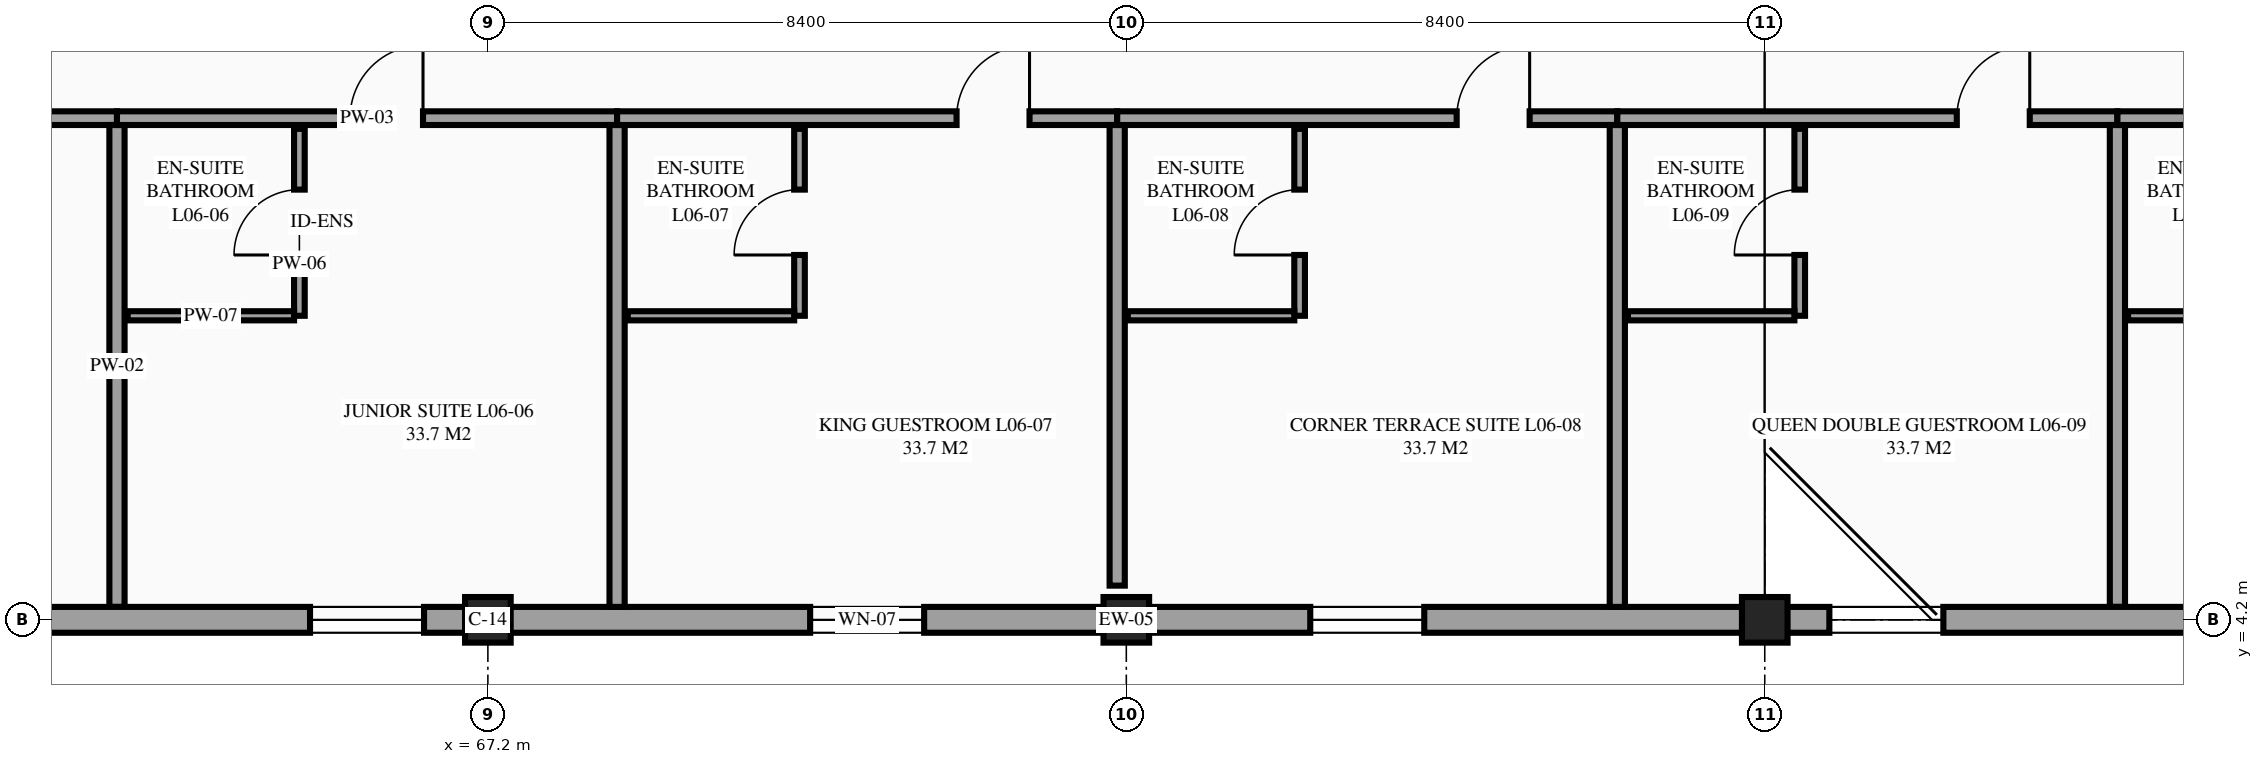
"""IFC4 building model, lengths in metres.
Left out: names, types, materials, properties, quantities, classifications, styles, units other than length and angle.
Written with IfcOpenShell. Run it as: python <this file> out.ifc"""

import sys

from ifc_helpers import new_model, si_unit, direction, frame, frame_2d, origin, origin_2d, place, context, subcontext, project, spatial, rectangle, extrude, element, fill, save


model = new_model("IFC4")
c1 = context("Model", 3, precision=1e-05, world=origin(), true_north=direction((0.0, 1.0)))
c2 = subcontext(c1, "Body", "Model", "MODEL_VIEW")
j1 = project(units=[si_unit("LENGTHUNIT", "METRE"), si_unit("PLANEANGLEUNIT", "RADIAN")], contexts=[c1])
p1 = place(None, origin())
s1 = spatial("IfcSite", under=j1, at=p1, CompositionType="ELEMENT")
p2 = place(p1, origin())
s2 = spatial("IfcBuilding", under=s1, at=p2, CompositionType="ELEMENT")
p3 = place(p2, frame((0.0, 0.0, 25.5)))
s3 = spatial("IfcBuildingStorey", under=s2, at=p3, CompositionType="ELEMENT", Elevation=25.5)
for number, where, z_axis, x_axis in (
    (1, (67.2, 4.2, 0.0), (0.0, 0.0, 1.0), (1.0, 0.0, 0.0)),
    (2, (75.6, 4.2, 0.0), (0.0, 0.0, 1.0), (1.0, 0.0, 0.0)),
    (3, (84.0, 4.2, 0.0), (0.0, 0.0, 1.0), (1.0, 0.0, 0.0)),
):
    element("IfcColumn", number, at=place(p3, frame(where, z_axis=z_axis, x_axis=x_axis)), inside=s3, PredefinedType="COLUMN", context=c2, shape_type="SweptSolid", body=[
        extrude(rectangle(XDim=0.6, YDim=0.6, at=origin_2d()), origin(), (0.0, 0.0, 1.0), 3.6),
    ])
p4 = place(p3, frame((67.2, 4.2, 0.0), z_axis=(0.0, 0.0, 1.0), x_axis=(1.0, 0.0, 0.0)))
e4 = element("IfcWall", 4, at=p4, inside=s3, PredefinedType="STANDARD", context=c2, shape_type="SweptSolid", body=[
    extrude(rectangle(XDim=16.8, YDim=0.34, at=frame_2d((8.4, 0.0))), origin(), (0.0, 0.0, 1.0), 2.43),
])
p5 = place(p4, frame((4.24, 0.0, 0.85)))
e5 = element("IfcOpeningElement", 5, at=p5, cuts=e4, PredefinedType="OPENING", context=c2, shape_type="SweptSolid", body=[
    extrude(rectangle(XDim=1.5, YDim=1.5, at=frame_2d((0.75, 0.75))), frame((0.0, 0.18, 0.0), z_axis=(0.0, -1.0, 0.0), x_axis=(1.0, 0.0, 0.0)), (0.0, 0.0, 1.0), 0.36),
])
p6 = place(p4, frame((10.82, 0.0, 0.85)))
e6 = element("IfcOpeningElement", 6, at=p6, cuts=e4, PredefinedType="OPENING", context=c2, shape_type="SweptSolid", body=[
    extrude(rectangle(XDim=1.5, YDim=1.5, at=frame_2d((0.75, 0.75))), frame((0.0, 0.18, 0.0), z_axis=(0.0, -1.0, 0.0), x_axis=(1.0, 0.0, 0.0)), (0.0, 0.0, 1.0), 0.36),
])
p7 = place(p3, frame((55.74, 10.8, 0.0), z_axis=(0.0, 0.0, 1.0), x_axis=(1.0, 0.0, 0.0)))
e7 = element("IfcWall", 7, at=p7, inside=s3, PredefinedType="PARTITIONING", context=c2, shape_type="SweptSolid", body=[
    extrude(rectangle(XDim=6.58, YDim=0.18, at=frame_2d((3.29, 0.0))), origin(), (0.0, 0.0, 1.0), 3.375),
])
p8 = place(p7, frame((4.467, 0.0, 0.0)))
e8 = element("IfcOpeningElement", 8, at=p8, cuts=e7, PredefinedType="OPENING", context=c2, shape_type="SweptSolid", body=[
    extrude(rectangle(XDim=0.96, YDim=2.15, at=frame_2d((0.48, 1.075))), frame((0.0, 0.1, 0.0), z_axis=(0.0, -1.0, 0.0), x_axis=(1.0, 0.0, 0.0)), (0.0, 0.0, 1.0), 0.2),
])
p9 = place(p3, frame((62.32, 4.37, 0.0), z_axis=(0.0, 0.0, 1.0), x_axis=(0.0, 1.0, 0.0)))
e9 = element("IfcWall", 9, at=p9, inside=s3, PredefinedType="PARTITIONING", context=c2, shape_type="SweptSolid", body=[
    extrude(rectangle(XDim=6.34, YDim=0.2, at=frame_2d((3.17, 0.0))), origin(), (0.0, 0.0, 1.0), 3.375),
])
p10 = place(p3, frame((62.32, 10.8, 0.0), z_axis=(0.0, 0.0, 1.0), x_axis=(1.0, 0.0, 0.0)))
e10 = element("IfcWall", 10, at=p10, inside=s3, PredefinedType="PARTITIONING", context=c2, shape_type="SweptSolid", body=[
    extrude(rectangle(XDim=6.58, YDim=0.18, at=frame_2d((3.29, 0.0))), origin(), (0.0, 0.0, 1.0), 3.375),
])
p11 = place(p10, frame((3.067, 0.0, 0.0)))
e11 = element("IfcOpeningElement", 11, at=p11, cuts=e10, PredefinedType="OPENING", context=c2, shape_type="SweptSolid", body=[
    extrude(rectangle(XDim=0.96, YDim=2.15, at=frame_2d((0.48, 1.075))), frame((0.0, 0.1, 0.0), z_axis=(0.0, -1.0, 0.0), x_axis=(1.0, 0.0, 0.0)), (0.0, 0.0, 1.0), 0.2),
])
p12 = place(p3, frame((68.9, 4.37, 0.0), z_axis=(0.0, 0.0, 1.0), x_axis=(0.0, 1.0, 0.0)))
e12 = element("IfcWall", 12, at=p12, inside=s3, PredefinedType="PARTITIONING", context=c2, shape_type="SweptSolid", body=[
    extrude(rectangle(XDim=6.34, YDim=0.2, at=frame_2d((3.17, 0.0))), origin(), (0.0, 0.0, 1.0), 3.375),
])
p13 = place(p3, frame((64.72, 8.2, 0.0), z_axis=(0.0, 0.0, 1.0), x_axis=(0.0, 1.0, 0.0)))
e13 = element("IfcWall", 13, at=p13, inside=s3, PredefinedType="PARTITIONING", context=c2, shape_type="SweptSolid", body=[
    extrude(rectangle(XDim=2.46, YDim=0.14, at=frame_2d((1.23, 0.0))), origin(), (0.0, 0.0, 1.0), 3.375),
])
p14 = place(p13, frame((0.8, 0.0, 0.0)))
e14 = element("IfcOpeningElement", 14, at=p14, cuts=e13, PredefinedType="OPENING", context=c2, shape_type="SweptSolid", body=[
    extrude(rectangle(XDim=0.86, YDim=2.1, at=frame_2d((0.43, 1.05))), frame((0.0, 0.08, 0.0), z_axis=(0.0, -1.0, 0.0), x_axis=(1.0, 0.0, 0.0)), (0.0, 0.0, 1.0), 0.16),
])
p15 = place(p3, frame((62.46, 8.2, 0.0), z_axis=(0.0, 0.0, 1.0), x_axis=(1.0, 0.0, 0.0)))
e15 = element("IfcWall", 15, at=p15, inside=s3, PredefinedType="PARTITIONING", context=c2, shape_type="SweptSolid", body=[
    extrude(rectangle(XDim=2.19, YDim=0.12, at=frame_2d((1.095, 0.0))), origin(), (0.0, 0.0, 1.0), 3.375),
])
p16 = place(p3, frame((68.9, 10.8, 0.0), z_axis=(0.0, 0.0, 1.0), x_axis=(1.0, 0.0, 0.0)))
e16 = element("IfcWall", 16, at=p16, inside=s3, PredefinedType="PARTITIONING", context=c2, shape_type="SweptSolid", body=[
    extrude(rectangle(XDim=6.58, YDim=0.18, at=frame_2d((3.29, 0.0))), origin(), (0.0, 0.0, 1.0), 3.375),
])
p17 = place(p16, frame((4.467, 0.0, 0.0)))
e17 = element("IfcOpeningElement", 17, at=p17, cuts=e16, PredefinedType="OPENING", context=c2, shape_type="SweptSolid", body=[
    extrude(rectangle(XDim=0.96, YDim=2.15, at=frame_2d((0.48, 1.075))), frame((0.0, 0.1, 0.0), z_axis=(0.0, -1.0, 0.0), x_axis=(1.0, 0.0, 0.0)), (0.0, 0.0, 1.0), 0.2),
])
p18 = place(p3, frame((75.48, 4.65, 0.0), z_axis=(0.0, 0.0, 1.0), x_axis=(0.0, 1.0, 0.0)))
e18 = element("IfcWall", 18, at=p18, inside=s3, PredefinedType="PARTITIONING", context=c2, shape_type="SweptSolid", body=[
    extrude(rectangle(XDim=6.06, YDim=0.2, at=frame_2d((3.03, 0.0))), origin(), (0.0, 0.0, 1.0), 2.53),
])
p19 = place(p3, frame((71.3, 8.2, 0.0), z_axis=(0.0, 0.0, 1.0), x_axis=(0.0, 1.0, 0.0)))
e19 = element("IfcWall", 19, at=p19, inside=s3, PredefinedType="PARTITIONING", context=c2, shape_type="SweptSolid", body=[
    extrude(rectangle(XDim=2.46, YDim=0.14, at=frame_2d((1.23, 0.0))), origin(), (0.0, 0.0, 1.0), 3.375),
])
p20 = place(p19, frame((0.8, 0.0, 0.0)))
e20 = element("IfcOpeningElement", 20, at=p20, cuts=e19, PredefinedType="OPENING", context=c2, shape_type="SweptSolid", body=[
    extrude(rectangle(XDim=0.86, YDim=2.1, at=frame_2d((0.43, 1.05))), frame((0.0, 0.08, 0.0), z_axis=(0.0, -1.0, 0.0), x_axis=(1.0, 0.0, 0.0)), (0.0, 0.0, 1.0), 0.16),
])
p21 = place(p3, frame((69.04, 8.2, 0.0), z_axis=(0.0, 0.0, 1.0), x_axis=(1.0, 0.0, 0.0)))
e21 = element("IfcWall", 21, at=p21, inside=s3, PredefinedType="PARTITIONING", context=c2, shape_type="SweptSolid", body=[
    extrude(rectangle(XDim=2.19, YDim=0.12, at=frame_2d((1.095, 0.0))), origin(), (0.0, 0.0, 1.0), 3.375),
])
p22 = place(p3, frame((75.48, 10.8, 0.0), z_axis=(0.0, 0.0, 1.0), x_axis=(1.0, 0.0, 0.0)))
e22 = element("IfcWall", 22, at=p22, inside=s3, PredefinedType="PARTITIONING", context=c2, shape_type="SweptSolid", body=[
    extrude(rectangle(XDim=6.58, YDim=0.18, at=frame_2d((3.29, 0.0))), origin(), (0.0, 0.0, 1.0), 3.375),
])
p23 = place(p22, frame((4.467, 0.0, 0.0)))
e23 = element("IfcOpeningElement", 23, at=p23, cuts=e22, PredefinedType="OPENING", context=c2, shape_type="SweptSolid", body=[
    extrude(rectangle(XDim=0.96, YDim=2.15, at=frame_2d((0.48, 1.075))), frame((0.0, 0.1, 0.0), z_axis=(0.0, -1.0, 0.0), x_axis=(1.0, 0.0, 0.0)), (0.0, 0.0, 1.0), 0.2),
])
p24 = place(p3, frame((82.06, 4.37, 0.0), z_axis=(0.0, 0.0, 1.0), x_axis=(0.0, 1.0, 0.0)))
e24 = element("IfcWall", 24, at=p24, inside=s3, PredefinedType="PARTITIONING", context=c2, shape_type="SweptSolid", body=[
    extrude(rectangle(XDim=6.34, YDim=0.2, at=frame_2d((3.17, 0.0))), origin(), (0.0, 0.0, 1.0), 3.375),
])
p25 = place(p3, frame((77.88, 8.2, 0.0), z_axis=(0.0, 0.0, 1.0), x_axis=(0.0, 1.0, 0.0)))
e25 = element("IfcWall", 25, at=p25, inside=s3, PredefinedType="PARTITIONING", context=c2, shape_type="SweptSolid", body=[
    extrude(rectangle(XDim=2.46, YDim=0.14, at=frame_2d((1.23, 0.0))), origin(), (0.0, 0.0, 1.0), 3.375),
])
p26 = place(p25, frame((0.8, 0.0, 0.0)))
e26 = element("IfcOpeningElement", 26, at=p26, cuts=e25, PredefinedType="OPENING", context=c2, shape_type="SweptSolid", body=[
    extrude(rectangle(XDim=0.86, YDim=2.1, at=frame_2d((0.43, 1.05))), frame((0.0, 0.08, 0.0), z_axis=(0.0, -1.0, 0.0), x_axis=(1.0, 0.0, 0.0)), (0.0, 0.0, 1.0), 0.16),
])
p27 = place(p3, frame((75.62, 8.2, 0.0), z_axis=(0.0, 0.0, 1.0), x_axis=(1.0, 0.0, 0.0)))
e27 = element("IfcWall", 27, at=p27, inside=s3, PredefinedType="PARTITIONING", context=c2, shape_type="SweptSolid", body=[
    extrude(rectangle(XDim=2.19, YDim=0.12, at=frame_2d((1.095, 0.0))), origin(), (0.0, 0.0, 1.0), 3.375),
])
p28 = place(p3, frame((82.06, 10.8, 0.0), z_axis=(0.0, 0.0, 1.0), x_axis=(1.0, 0.0, 0.0)))
e28 = element("IfcWall", 28, at=p28, inside=s3, PredefinedType="PARTITIONING", context=c2, shape_type="SweptSolid", body=[
    extrude(rectangle(XDim=6.58, YDim=0.18, at=frame_2d((3.29, 0.0))), origin(), (0.0, 0.0, 1.0), 3.375),
])
p29 = place(p28, frame((4.467, 0.0, 0.0)))
e29 = element("IfcOpeningElement", 29, at=p29, cuts=e28, PredefinedType="OPENING", context=c2, shape_type="SweptSolid", body=[
    extrude(rectangle(XDim=0.96, YDim=2.15, at=frame_2d((0.48, 1.075))), frame((0.0, 0.1, 0.0), z_axis=(0.0, -1.0, 0.0), x_axis=(1.0, 0.0, 0.0)), (0.0, 0.0, 1.0), 0.2),
])
p30 = place(p3, frame((88.64, 4.37, 0.0), z_axis=(0.0, 0.0, 1.0), x_axis=(0.0, 1.0, 0.0)))
e30 = element("IfcWall", 30, at=p30, inside=s3, PredefinedType="PARTITIONING", context=c2, shape_type="SweptSolid", body=[
    extrude(rectangle(XDim=6.34, YDim=0.2, at=frame_2d((3.17, 0.0))), origin(), (0.0, 0.0, 1.0), 3.375),
])
p31 = place(p3, frame((84.46, 8.2, 0.0), z_axis=(0.0, 0.0, 1.0), x_axis=(0.0, 1.0, 0.0)))
e31 = element("IfcWall", 31, at=p31, inside=s3, PredefinedType="PARTITIONING", context=c2, shape_type="SweptSolid", body=[
    extrude(rectangle(XDim=2.46, YDim=0.14, at=frame_2d((1.23, 0.0))), origin(), (0.0, 0.0, 1.0), 3.375),
])
p32 = place(p31, frame((0.8, 0.0, 0.0)))
e32 = element("IfcOpeningElement", 32, at=p32, cuts=e31, PredefinedType="OPENING", context=c2, shape_type="SweptSolid", body=[
    extrude(rectangle(XDim=0.86, YDim=2.1, at=frame_2d((0.43, 1.05))), frame((0.0, 0.08, 0.0), z_axis=(0.0, -1.0, 0.0), x_axis=(1.0, 0.0, 0.0)), (0.0, 0.0, 1.0), 0.16),
])
p33 = place(p3, frame((82.2, 8.2, 0.0), z_axis=(0.0, 0.0, 1.0), x_axis=(1.0, 0.0, 0.0)))
e33 = element("IfcWall", 33, at=p33, inside=s3, PredefinedType="PARTITIONING", context=c2, shape_type="SweptSolid", body=[
    extrude(rectangle(XDim=2.19, YDim=0.12, at=frame_2d((1.095, 0.0))), origin(), (0.0, 0.0, 1.0), 3.375),
])
p34 = place(p3, frame((88.64, 10.8, 0.0), z_axis=(0.0, 0.0, 1.0), x_axis=(1.0, 0.0, 0.0)))
e34 = element("IfcWall", 34, at=p34, inside=s3, PredefinedType="PARTITIONING", context=c2, shape_type="SweptSolid", body=[
    extrude(rectangle(XDim=6.58, YDim=0.18, at=frame_2d((3.29, 0.0))), origin(), (0.0, 0.0, 1.0), 3.375),
])
p35 = place(p34, frame((4.817, 0.0, 0.0)))
e35 = element("IfcOpeningElement", 35, at=p35, cuts=e34, PredefinedType="OPENING", context=c2, shape_type="SweptSolid", body=[
    extrude(rectangle(XDim=0.96, YDim=2.15, at=frame_2d((0.48, 1.075))), frame((0.0, 0.1, 0.0), z_axis=(0.0, -1.0, 0.0), x_axis=(1.0, 0.0, 0.0)), (0.0, 0.0, 1.0), 0.2),
])
p36 = place(p3, frame((88.78, 8.2, 0.0), z_axis=(0.0, 0.0, 1.0), x_axis=(1.0, 0.0, 0.0)))
e36 = element("IfcWall", 36, at=p36, inside=s3, PredefinedType="PARTITIONING", context=c2, shape_type="SweptSolid", body=[
    extrude(rectangle(XDim=2.19, YDim=0.12, at=frame_2d((1.095, 0.0))), origin(), (0.0, 0.0, 1.0), 3.375),
])
p37 = place(p3, frame((58.8, 4.2, 0.0), z_axis=(0.0, 0.0, 1.0), x_axis=(1.0, 0.0, 0.0)))
e37 = element("IfcWall", 37, at=p37, inside=s3, PredefinedType="STANDARD", context=c2, shape_type="SweptSolid", body=[
    extrude(rectangle(XDim=8.4, YDim=0.34, at=frame_2d((4.2, 0.0))), origin(), (0.0, 0.0, 1.0), 3.126),
])
p38 = place(p37, frame((0.73, 0.0, 0.85)))
e38 = element("IfcOpeningElement", 38, at=p38, cuts=e37, PredefinedType="OPENING", context=c2, shape_type="SweptSolid", body=[
    extrude(rectangle(XDim=1.5, YDim=1.5, at=frame_2d((0.75, 0.75))), frame((0.0, 0.18, 0.0), z_axis=(0.0, -1.0, 0.0), x_axis=(1.0, 0.0, 0.0)), (0.0, 0.0, 1.0), 0.36),
])
p39 = place(p37, frame((6.06, 0.0, 0.85)))
e39 = element("IfcOpeningElement", 39, at=p39, cuts=e37, PredefinedType="OPENING", context=c2, shape_type="SweptSolid", body=[
    extrude(rectangle(XDim=1.5, YDim=1.5, at=frame_2d((0.75, 0.75))), frame((0.0, 0.18, 0.0), z_axis=(0.0, -1.0, 0.0), x_axis=(1.0, 0.0, 0.0)), (0.0, 0.0, 1.0), 0.36),
])
p40 = place(p3, frame((84.0, 4.2, 0.0), z_axis=(0.0, 0.0, 1.0), x_axis=(1.0, 0.0, 0.0)))
e40 = element("IfcWall", 40, at=p40, inside=s3, PredefinedType="STANDARD", context=c2, shape_type="SweptSolid", body=[
    extrude(rectangle(XDim=8.4, YDim=0.34, at=frame_2d((4.2, 0.0))), origin(), (0.0, 0.0, 1.0), 3.133),
])
p41 = place(p40, frame((0.85, 0.0, 0.85)))
e41 = element("IfcOpeningElement", 41, at=p41, cuts=e40, PredefinedType="OPENING", context=c2, shape_type="SweptSolid", body=[
    extrude(rectangle(XDim=1.5, YDim=1.5, at=frame_2d((0.75, 0.75))), frame((0.0, 0.18, 0.0), z_axis=(0.0, -1.0, 0.0), x_axis=(1.0, 0.0, 0.0)), (0.0, 0.0, 1.0), 0.36),
])
p42 = place(p40, frame((6.18, 0.0, 0.85)))
e42 = element("IfcOpeningElement", 42, at=p42, cuts=e40, PredefinedType="OPENING", context=c2, shape_type="SweptSolid", body=[
    extrude(rectangle(XDim=1.5, YDim=1.5, at=frame_2d((0.75, 0.75))), frame((0.0, 0.18, 0.0), z_axis=(0.0, -1.0, 0.0), x_axis=(1.0, 0.0, 0.0)), (0.0, 0.0, 1.0), 0.36),
])
p43 = place(p39, origin())
e43 = element("IfcWindow", 43, at=p43, inside=s3, PartitioningType="SINGLE_PANEL", PredefinedType="WINDOW", context=c2, shape_type="SweptSolid", body=[
    extrude(rectangle(XDim=1.5, YDim=1.5, at=frame_2d((0.75, 0.75))), frame((0.0, 0.03, 0.0), z_axis=(0.0, -1.0, 0.0), x_axis=(1.0, 0.0, 0.0)), (0.0, 0.0, 1.0), 0.06),
])
fill(e39, e43)
p44 = place(p5, origin())
e44 = element("IfcWindow", 44, at=p44, inside=s3, PartitioningType="SINGLE_PANEL", PredefinedType="WINDOW", context=c2, shape_type="SweptSolid", body=[
    extrude(rectangle(XDim=1.5, YDim=1.5, at=frame_2d((0.75, 0.75))), frame((0.0, 0.03, 0.0), z_axis=(0.0, -1.0, 0.0), x_axis=(1.0, 0.0, 0.0)), (0.0, 0.0, 1.0), 0.06),
])
fill(e5, e44)
p45 = place(p6, origin())
e45 = element("IfcWindow", 45, at=p45, inside=s3, PartitioningType="SINGLE_PANEL", PredefinedType="WINDOW", context=c2, shape_type="SweptSolid", body=[
    extrude(rectangle(XDim=1.5, YDim=1.5, at=frame_2d((0.75, 0.75))), frame((0.0, 0.03, 0.0), z_axis=(0.0, -1.0, 0.0), x_axis=(1.0, 0.0, 0.0)), (0.0, 0.0, 1.0), 0.06),
])
fill(e6, e45)
p46 = place(p41, origin())
e46 = element("IfcWindow", 46, at=p46, inside=s3, PartitioningType="SINGLE_PANEL", PredefinedType="WINDOW", context=c2, shape_type="SweptSolid", body=[
    extrude(rectangle(XDim=1.5, YDim=1.5, at=frame_2d((0.75, 0.75))), frame((0.0, 0.03, 0.0), z_axis=(0.0, -1.0, 0.0), x_axis=(1.0, 0.0, 0.0)), (0.0, 0.0, 1.0), 0.06),
])
fill(e41, e46)
p47 = place(p11, origin())
e47 = element("IfcDoor", 47, at=p47, inside=s3, OperationType="SINGLE_SWING_RIGHT", PredefinedType="DOOR", context=c2, shape_type="SweptSolid", body=[
    extrude(rectangle(XDim=0.96, YDim=2.15, at=frame_2d((0.48, 1.075))), frame((0.0, 0.025, 0.0), z_axis=(0.0, -1.0, 0.0), x_axis=(1.0, 0.0, 0.0)), (0.0, 0.0, 1.0), 0.05),
])
fill(e11, e47)
p48 = place(p14, origin())
e48 = element("IfcDoor", 48, at=p48, inside=s3, OperationType="SINGLE_SWING_LEFT", PredefinedType="DOOR", context=c2, shape_type="SweptSolid", body=[
    extrude(rectangle(XDim=0.86, YDim=2.1, at=frame_2d((0.43, 1.05))), frame((0.0, 0.025, 0.0), z_axis=(0.0, -1.0, 0.0), x_axis=(1.0, 0.0, 0.0)), (0.0, 0.0, 1.0), 0.05),
])
fill(e14, e48)
p49 = place(p17, origin())
e49 = element("IfcDoor", 49, at=p49, inside=s3, OperationType="SINGLE_SWING_RIGHT", PredefinedType="DOOR", context=c2, shape_type="SweptSolid", body=[
    extrude(rectangle(XDim=0.96, YDim=2.15, at=frame_2d((0.48, 1.075))), frame((0.0, 0.025, 0.0), z_axis=(0.0, -1.0, 0.0), x_axis=(1.0, 0.0, 0.0)), (0.0, 0.0, 1.0), 0.05),
])
fill(e17, e49)
p50 = place(p20, origin())
e50 = element("IfcDoor", 50, at=p50, inside=s3, OperationType="SINGLE_SWING_LEFT", PredefinedType="DOOR", context=c2, shape_type="SweptSolid", body=[
    extrude(rectangle(XDim=0.86, YDim=2.1, at=frame_2d((0.43, 1.05))), frame((0.0, 0.025, 0.0), z_axis=(0.0, -1.0, 0.0), x_axis=(1.0, 0.0, 0.0)), (0.0, 0.0, 1.0), 0.05),
])
fill(e20, e50)
p51 = place(p23, origin())
e51 = element("IfcDoor", 51, at=p51, inside=s3, OperationType="SINGLE_SWING_RIGHT", PredefinedType="DOOR", context=c2, shape_type="SweptSolid", body=[
    extrude(rectangle(XDim=0.96, YDim=2.15, at=frame_2d((0.48, 1.075))), frame((0.0, 0.025, 0.0), z_axis=(0.0, -1.0, 0.0), x_axis=(1.0, 0.0, 0.0)), (0.0, 0.0, 1.0), 0.05),
])
fill(e23, e51)
p52 = place(p26, origin())
e52 = element("IfcDoor", 52, at=p52, inside=s3, OperationType="SINGLE_SWING_LEFT", PredefinedType="DOOR", context=c2, shape_type="SweptSolid", body=[
    extrude(rectangle(XDim=0.86, YDim=2.1, at=frame_2d((0.43, 1.05))), frame((0.0, 0.025, 0.0), z_axis=(0.0, -1.0, 0.0), x_axis=(1.0, 0.0, 0.0)), (0.0, 0.0, 1.0), 0.05),
])
fill(e26, e52)
p53 = place(p29, origin())
e53 = element("IfcDoor", 53, at=p53, inside=s3, OperationType="SINGLE_SWING_RIGHT", PredefinedType="DOOR", context=c2, shape_type="SweptSolid", body=[
    extrude(rectangle(XDim=0.96, YDim=2.15, at=frame_2d((0.48, 1.075))), frame((0.0, 0.025, 0.0), z_axis=(0.0, -1.0, 0.0), x_axis=(1.0, 0.0, 0.0)), (0.0, 0.0, 1.0), 0.05),
])
fill(e29, e53)
p54 = place(p32, origin())
e54 = element("IfcDoor", 54, at=p54, inside=s3, OperationType="SINGLE_SWING_LEFT", PredefinedType="DOOR", context=c2, shape_type="SweptSolid", body=[
    extrude(rectangle(XDim=0.86, YDim=2.1, at=frame_2d((0.43, 1.05))), frame((0.0, 0.025, 0.0), z_axis=(0.0, -1.0, 0.0), x_axis=(1.0, 0.0, 0.0)), (0.0, 0.0, 1.0), 0.05),
])
fill(e32, e54)
save(model, sys.argv[1])
